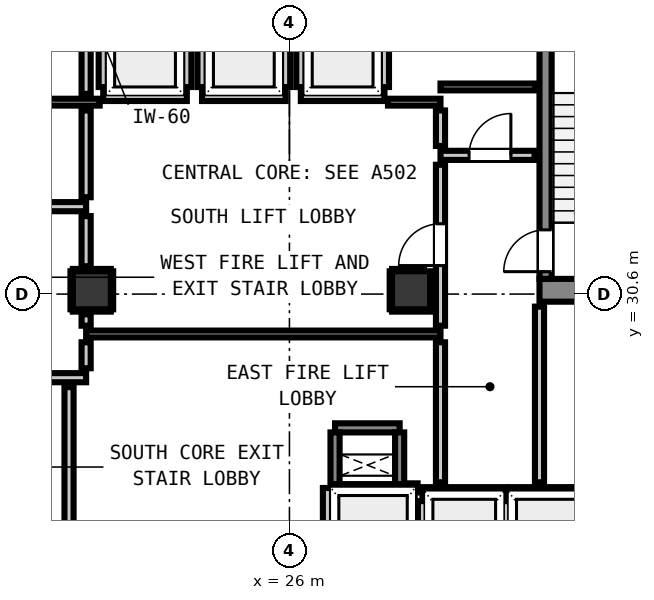
"""IFC4 building model, lengths in metres.
Left out: names, types, materials, properties, quantities, classifications, styles, units other than length and angle.
Written with IfcOpenShell. Run it as: python <this file> out.ifc"""

import sys

from ifc_helpers import new_model, si_unit, direction, frame, frame_2d, origin, origin_2d, place, context, subcontext, project, spatial, rectangle, extrude, element, fill, save


model = new_model("IFC4")
c1 = context("Model", 3, precision=1e-05, world=origin(), true_north=direction((0.0, 1.0)))
c2 = subcontext(c1, "Body", "Model", "MODEL_VIEW")
j1 = project(units=[si_unit("LENGTHUNIT", "METRE"), si_unit("PLANEANGLEUNIT", "RADIAN")], contexts=[c1])
p1 = place(None, origin())
s1 = spatial("IfcSite", under=j1, at=p1, CompositionType="ELEMENT")
p2 = place(p1, origin())
s2 = spatial("IfcBuilding", under=s1, at=p2, CompositionType="ELEMENT")
p3 = place(p2, frame((0.0, 0.0, 13.6)))
s3 = spatial("IfcBuildingStorey", under=s2, at=p3, CompositionType="ELEMENT", Elevation=13.6)
p4 = place(p3, frame((32.58, 30.7, 0.0), z_axis=(0.0, 0.0, 1.0), x_axis=(1.0, 0.0, 0.0)))
e1 = element("IfcWall", 1, at=p4, inside=s3, PredefinedType="SHEAR", context=c2, shape_type="SweptSolid", body=[
    extrude(rectangle(XDim=3.415, YDim=0.6, at=frame_2d((1.708, 0.0))), origin(), (0.0, 0.0, 1.0), 4.2),
])
p5 = place(p3, frame((32.74, 31.0, 0.0), z_axis=(0.0, 0.0, 1.0), x_axis=(0.0, 1.0, 0.0)))
e2 = element("IfcWall", 2, at=p5, inside=s3, PredefinedType="SHEAR", context=c2, shape_type="SweptSolid", body=[
    extrude(rectangle(XDim=7.8, YDim=0.32, at=frame_2d((3.9, 0.0))), origin(), (0.0, 0.0, 1.0), 4.2),
])
p6 = place(p5, frame((0.19, 0.0, 0.0)))
e3 = element("IfcOpeningElement", 3, at=p6, cuts=e2, PredefinedType="OPENING", context=c2, shape_type="SweptSolid", body=[
    extrude(rectangle(XDim=1.1, YDim=2.15, at=frame_2d((0.55, 1.075))), frame((0.0, 0.17, 0.0), z_axis=(0.0, -1.0, 0.0), x_axis=(1.0, 0.0, 0.0)), (0.0, 0.0, 1.0), 0.34),
])
for number, where, z_axis, x_axis in (
    (4, (27.2, 25.48, 0.0), (0.0, 0.0, 1.0), (1.0, 0.0, 0.0)),
    (5, (27.2, 27.08, 0.0), (0.0, 0.0, 1.0), (1.0, 0.0, 0.0)),
):
    element("IfcWall", number, at=place(p3, frame(where, z_axis=z_axis, x_axis=x_axis)), inside=s3, PredefinedType="SHEAR", context=c2, shape_type="SweptSolid", body=[
        extrude(rectangle(XDim=1.7, YDim=0.24, at=frame_2d((0.85, 0.0))), origin(), (0.0, 0.0, 1.0), 4.2),
    ])
for number, where, z_axis, x_axis in (
    (6, (27.2, 25.6, 0.0), (0.0, 0.0, 1.0), (0.0, 1.0, 0.0)),
    (7, (28.9, 25.6, 0.0), (0.0, 0.0, 1.0), (0.0, 1.0, 0.0)),
):
    element("IfcWall", number, at=place(p3, frame(where, z_axis=z_axis, x_axis=x_axis)), inside=s3, PredefinedType="SHEAR", context=c2, shape_type="SweptSolid", body=[
        extrude(rectangle(XDim=1.36, YDim=0.24, at=frame_2d((0.68, 0.0))), origin(), (0.0, 0.0, 1.0), 4.2),
    ])
for number, where, z_axis, x_axis in (
    (8, (20.8, 30.7, 0.0), (0.0, 0.0, 1.0), (1.0, 0.0, 0.0)),
    (9, (29.2, 30.7, 0.0), (0.0, 0.0, 1.0), (1.0, 0.0, 0.0)),
):
    element("IfcColumn", number, at=place(p3, frame(where, z_axis=z_axis, x_axis=x_axis)), inside=s3, PredefinedType="COLUMN", context=c2, shape_type="SweptSolid", body=[
        extrude(rectangle(XDim=1.0, YDim=1.0, at=origin_2d()), origin(), (0.0, 0.0, 1.0), 4.2),
    ])
p7 = place(p3, frame((21.1, 35.8, 0.0), z_axis=(0.0, 0.0, 1.0), x_axis=(1.0, 0.0, 0.0)))
e10 = element("IfcWall", 10, at=p7, inside=s3, PredefinedType="PARTITIONING", context=c2, shape_type="SweptSolid", body=[
    extrude(rectangle(XDim=2.2, YDim=0.24, at=frame_2d((1.1, 0.0))), origin(), (0.0, 0.0, 1.0), 3.78),
])
p8 = place(p3, frame((21.1, 36.048, 0.0), z_axis=(0.0, 0.0, 1.0), x_axis=(0.0, 1.0, 0.0)))
e11 = element("IfcWall", 11, at=p8, inside=s3, PredefinedType="PARTITIONING", context=c2, shape_type="SweptSolid", body=[
    extrude(rectangle(XDim=2.104, YDim=0.24, at=frame_2d((1.052, 0.0))), origin(), (0.0, 0.0, 1.0), 2.815),
])
p9 = place(p3, frame((23.3, 36.048, 0.0), z_axis=(0.0, 0.0, 1.0), x_axis=(0.0, 1.0, 0.0)))
e12 = element("IfcWall", 12, at=p9, inside=s3, PredefinedType="PARTITIONING", context=c2, shape_type="SweptSolid", body=[
    extrude(rectangle(XDim=2.104, YDim=0.24, at=frame_2d((1.052, 0.0))), origin(), (0.0, 0.0, 1.0), 3.78),
])
p10 = place(p3, frame((23.7, 35.8, 0.0), z_axis=(0.0, 0.0, 1.0), x_axis=(1.0, 0.0, 0.0)))
e13 = element("IfcWall", 13, at=p10, inside=s3, PredefinedType="PARTITIONING", context=c2, shape_type="SweptSolid", body=[
    extrude(rectangle(XDim=2.2, YDim=0.24, at=frame_2d((1.1, 0.0))), origin(), (0.0, 0.0, 1.0), 3.78),
])
for number, where, z_axis, x_axis in (
    (14, (23.7, 36.048, 0.0), (0.0, 0.0, 1.0), (0.0, 1.0, 0.0)),
    (15, (25.9, 36.048, 0.0), (0.0, 0.0, 1.0), (0.0, 1.0, 0.0)),
):
    element("IfcWall", number, at=place(p3, frame(where, z_axis=z_axis, x_axis=x_axis)), inside=s3, PredefinedType="PARTITIONING", context=c2, shape_type="SweptSolid", body=[
        extrude(rectangle(XDim=2.104, YDim=0.24, at=frame_2d((1.052, 0.0))), origin(), (0.0, 0.0, 1.0), 3.78),
    ])
p11 = place(p3, frame((26.3, 35.8, 0.0), z_axis=(0.0, 0.0, 1.0), x_axis=(1.0, 0.0, 0.0)))
e16 = element("IfcWall", 16, at=p11, inside=s3, PredefinedType="PARTITIONING", context=c2, shape_type="SweptSolid", body=[
    extrude(rectangle(XDim=2.2, YDim=0.24, at=frame_2d((1.1, 0.0))), origin(), (0.0, 0.0, 1.0), 3.78),
])
for number, where, z_axis, x_axis in (
    (17, (26.3, 36.048, 0.0), (0.0, 0.0, 1.0), (0.0, 1.0, 0.0)),
    (18, (28.5, 36.048, 0.0), (0.0, 0.0, 1.0), (0.0, 1.0, 0.0)),
):
    element("IfcWall", number, at=place(p3, frame(where, z_axis=z_axis, x_axis=x_axis)), inside=s3, PredefinedType="PARTITIONING", context=c2, shape_type="SweptSolid", body=[
        extrude(rectangle(XDim=2.104, YDim=0.24, at=frame_2d((1.052, 0.0))), origin(), (0.0, 0.0, 1.0), 3.78),
    ])
p12 = place(p3, frame((29.5, 25.4, 0.0), z_axis=(0.0, 0.0, 1.0), x_axis=(1.0, 0.0, 0.0)))
e19 = element("IfcWall", 19, at=p12, inside=s3, PredefinedType="PARTITIONING", context=c2, shape_type="SweptSolid", body=[
    extrude(rectangle(XDim=2.2, YDim=0.24, at=frame_2d((1.1, 0.0))), origin(), (0.0, 0.0, 1.0), 3.78),
])
p13 = place(p3, frame((29.5, 22.632, 0.0), z_axis=(0.0, 0.0, 1.0), x_axis=(0.0, 1.0, 0.0)))
e20 = element("IfcWall", 20, at=p13, inside=s3, PredefinedType="PARTITIONING", context=c2, shape_type="SweptSolid", body=[
    extrude(rectangle(XDim=2.52, YDim=0.24, at=frame_2d((1.26, 0.0))), origin(), (0.0, 0.0, 1.0), 2.815),
])
p14 = place(p3, frame((31.7, 22.73, 0.0), z_axis=(0.0, 0.0, 1.0), x_axis=(0.0, 1.0, 0.0)))
e21 = element("IfcWall", 21, at=p14, inside=s3, PredefinedType="PARTITIONING", context=c2, shape_type="SweptSolid", body=[
    extrude(rectangle(XDim=2.422, YDim=0.24, at=frame_2d((1.211, 0.0))), origin(), (0.0, 0.0, 1.0), 3.78),
])
p15 = place(p3, frame((31.828, 25.4, 0.0), z_axis=(0.0, 0.0, 1.0), x_axis=(1.0, 0.0, 0.0)))
e22 = element("IfcWall", 22, at=p15, inside=s3, PredefinedType="PARTITIONING", context=c2, shape_type="SweptSolid", body=[
    extrude(rectangle(XDim=2.072, YDim=0.24, at=frame_2d((1.036, 0.0))), origin(), (0.0, 0.0, 1.0), 3.78),
])
p16 = place(p3, frame((29.103, 25.5, 0.0), z_axis=(0.0, 0.0, 1.0), x_axis=(1.0, 0.0, 0.0)))
e23 = element("IfcWall", 23, at=p16, inside=s3, PredefinedType="PARTITIONING", context=c2, shape_type="SweptSolid", body=[
    extrude(rectangle(XDim=0.269, YDim=0.24, at=frame_2d((0.135, 0.0))), origin(), (0.0, 0.0, 1.0), 3.78),
])
p17 = place(p3, frame((27.0, 22.73, 0.0), z_axis=(0.0, 0.0, 1.0), x_axis=(0.0, 1.0, 0.0)))
e24 = element("IfcWall", 24, at=p17, inside=s3, PredefinedType="PARTITIONING", context=c2, shape_type="SweptSolid", body=[
    extrude(rectangle(XDim=2.768, YDim=0.24, at=frame_2d((1.384, 0.0))), origin(), (0.0, 0.0, 1.0), 3.78),
])
p18 = place(p3, frame((17.45, 28.4, 0.0), z_axis=(0.0, 0.0, 1.0), x_axis=(1.0, 0.0, 0.0)))
e25 = element("IfcWall", 25, at=p18, inside=s3, PredefinedType="PARTITIONING", context=c2, shape_type="SweptSolid", body=[
    extrude(rectangle(XDim=3.2, YDim=0.24, at=frame_2d((1.6, 0.0))), origin(), (0.0, 0.0, 1.0), 3.78),
])
p19 = place(p18, frame((0.784, 0.0, 0.0)))
e26 = element("IfcOpeningElement", 26, at=p19, cuts=e25, PredefinedType="OPENING", context=c2, shape_type="SweptSolid", body=[
    extrude(rectangle(XDim=1.1, YDim=2.15, at=frame_2d((0.55, 1.075))), frame((0.0, 0.13, 0.0), z_axis=(0.0, -1.0, 0.0), x_axis=(1.0, 0.0, 0.0)), (0.0, 0.0, 1.0), 0.26),
])
p20 = place(p3, frame((17.45, 32.9, 0.0), z_axis=(0.0, 0.0, 1.0), x_axis=(1.0, 0.0, 0.0)))
e27 = element("IfcWall", 27, at=p20, inside=s3, PredefinedType="PARTITIONING", context=c2, shape_type="SweptSolid", body=[
    extrude(rectangle(XDim=3.2, YDim=0.24, at=frame_2d((1.6, 0.0))), origin(), (0.0, 0.0, 1.0), 3.78),
])
p21 = place(p20, frame((0.159, 0.0, 0.0)))
e28 = element("IfcOpeningElement", 28, at=p21, cuts=e27, PredefinedType="OPENING", context=c2, shape_type="SweptSolid", body=[
    extrude(rectangle(XDim=1.1, YDim=2.15, at=frame_2d((0.55, 1.075))), frame((0.0, 0.13, 0.0), z_axis=(0.0, -1.0, 0.0), x_axis=(1.0, 0.0, 0.0)), (0.0, 0.0, 1.0), 0.26),
])
p22 = place(p3, frame((29.975, 34.25, 0.0), z_axis=(0.0, 0.0, 1.0), x_axis=(1.0, 0.0, 0.0)))
e29 = element("IfcWall", 29, at=p22, inside=s3, PredefinedType="PARTITIONING", context=c2, shape_type="SweptSolid", body=[
    extrude(rectangle(XDim=2.475, YDim=0.24, at=frame_2d((1.237, 0.0))), origin(), (0.0, 0.0, 1.0), 3.78),
])
p23 = place(p22, frame((0.752, 0.0, 0.0)))
e30 = element("IfcOpeningElement", 30, at=p23, cuts=e29, PredefinedType="OPENING", context=c2, shape_type="SweptSolid", body=[
    extrude(rectangle(XDim=1.1, YDim=2.15, at=frame_2d((0.55, 1.075))), frame((0.0, 0.13, 0.0), z_axis=(0.0, -1.0, 0.0), x_axis=(1.0, 0.0, 0.0)), (0.0, 0.0, 1.0), 0.26),
])
p24 = place(p3, frame((20.65, 29.55, 0.0), z_axis=(0.0, 0.0, 1.0), x_axis=(1.0, 0.0, 0.0)))
e31 = element("IfcWall", 31, at=p24, inside=s3, PredefinedType="PARTITIONING", context=c2, shape_type="SweptSolid", body=[
    extrude(rectangle(XDim=9.325, YDim=0.18, at=frame_2d((4.663, 0.0))), origin(), (0.0, 0.0, 1.0), 3.78),
])
p25 = place(p3, frame((18.95, 35.65, 0.0), z_axis=(0.0, 0.0, 1.0), x_axis=(1.0, 0.0, 0.0)))
e32 = element("IfcWall", 32, at=p25, inside=s3, PredefinedType="PARTITIONING", context=c2, shape_type="SweptSolid", body=[
    extrude(rectangle(XDim=2.057, YDim=0.18, at=frame_2d((1.029, 0.0))), origin(), (0.0, 0.0, 1.0), 3.78),
])
p26 = place(p3, frame((28.593, 35.65, 0.0), z_axis=(0.0, 0.0, 1.0), x_axis=(1.0, 0.0, 0.0)))
e33 = element("IfcWall", 33, at=p26, inside=s3, PredefinedType="PARTITIONING", context=c2, shape_type="SweptSolid", body=[
    extrude(rectangle(XDim=1.382, YDim=0.18, at=frame_2d((0.691, 0.0))), origin(), (0.0, 0.0, 1.0), 3.78),
])
p27 = place(p3, frame((29.975, 36.05, 0.0), z_axis=(0.0, 0.0, 1.0), x_axis=(1.0, 0.0, 0.0)))
e34 = element("IfcWall", 34, at=p27, inside=s3, PredefinedType="PARTITIONING", context=c2, shape_type="SweptSolid", body=[
    extrude(rectangle(XDim=2.505, YDim=0.18, at=frame_2d((1.252, 0.0))), origin(), (0.0, 0.0, 1.0), 3.78),
])
p28 = place(p3, frame((20.2, 22.586, 0.0), z_axis=(0.0, 0.0, 1.0), x_axis=(0.0, 1.0, 0.0)))
e35 = element("IfcWall", 35, at=p28, inside=s3, PredefinedType="PARTITIONING", context=c2, shape_type="SweptSolid", body=[
    extrude(rectangle(XDim=5.566, YDim=0.24, at=frame_2d((2.783, 0.0))), origin(), (0.0, 0.0, 1.0), 3.78),
])
p29 = place(p3, frame((20.65, 28.648, 0.0), z_axis=(0.0, 0.0, 1.0), x_axis=(0.0, 1.0, 0.0)))
e36 = element("IfcWall", 36, at=p29, inside=s3, PredefinedType="PARTITIONING", context=c2, shape_type="SweptSolid", body=[
    extrude(rectangle(XDim=0.684, YDim=0.24, at=frame_2d((0.342, 0.0))), origin(), (0.0, 0.0, 1.0), 2.815),
])
p30 = place(p3, frame((20.65, 29.768, 0.0), z_axis=(0.0, 0.0, 1.0), x_axis=(0.0, 1.0, 0.0)))
e37 = element("IfcWall", 37, at=p30, inside=s3, PredefinedType="PARTITIONING", context=c2, shape_type="SweptSolid", body=[
    extrude(rectangle(XDim=0.3, YDim=0.24, at=frame_2d((0.15, 0.0))), origin(), (0.0, 0.0, 1.0), 2.815),
])
p31 = place(p3, frame((20.65, 31.332, 0.0), z_axis=(0.0, 0.0, 1.0), x_axis=(0.0, 1.0, 0.0)))
e38 = element("IfcWall", 38, at=p31, inside=s3, PredefinedType="PARTITIONING", context=c2, shape_type="SweptSolid", body=[
    extrude(rectangle(XDim=1.32, YDim=0.24, at=frame_2d((0.66, 0.0))), origin(), (0.0, 0.0, 1.0), 2.815),
])
p32 = place(p3, frame((20.65, 33.148, 0.0), z_axis=(0.0, 0.0, 1.0), x_axis=(0.0, 1.0, 0.0)))
e39 = element("IfcWall", 39, at=p32, inside=s3, PredefinedType="PARTITIONING", context=c2, shape_type="SweptSolid", body=[
    extrude(rectangle(XDim=2.284, YDim=0.24, at=frame_2d((1.142, 0.0))), origin(), (0.0, 0.0, 1.0), 2.815),
])
p33 = place(p3, frame((20.65, 35.868, 0.0), z_axis=(0.0, 0.0, 1.0), x_axis=(0.0, 1.0, 0.0)))
e40 = element("IfcWall", 40, at=p33, inside=s3, PredefinedType="PARTITIONING", context=c2, shape_type="SweptSolid", body=[
    extrude(rectangle(XDim=2.684, YDim=0.24, at=frame_2d((1.342, 0.0))), origin(), (0.0, 0.0, 1.0), 2.815),
])
p34 = place(p3, frame((29.975, 25.648, 0.0), z_axis=(0.0, 0.0, 1.0), x_axis=(0.0, 1.0, 0.0)))
e41 = element("IfcWall", 41, at=p34, inside=s3, PredefinedType="PARTITIONING", context=c2, shape_type="SweptSolid", body=[
    extrude(rectangle(XDim=3.684, YDim=0.24, at=frame_2d((1.842, 0.0))), origin(), (0.0, 0.0, 1.0), 3.78),
])
p35 = place(p3, frame((29.975, 29.768, 0.0), z_axis=(0.0, 0.0, 1.0), x_axis=(0.0, 1.0, 0.0)))
e42 = element("IfcWall", 42, at=p35, inside=s3, PredefinedType="PARTITIONING", context=c2, shape_type="SweptSolid", body=[
    extrude(rectangle(XDim=4.234, YDim=0.24, at=frame_2d((2.117, 0.0))), origin(), (0.0, 0.0, 1.0), 3.78),
])
p36 = place(p35, frame((1.582, 0.0, 0.0)))
e43 = element("IfcOpeningElement", 43, at=p36, cuts=e42, PredefinedType="OPENING", context=c2, shape_type="SweptSolid", body=[
    extrude(rectangle(XDim=1.1, YDim=2.15, at=frame_2d((0.55, 1.075))), frame((0.0, 0.13, 0.0), z_axis=(0.0, -1.0, 0.0), x_axis=(1.0, 0.0, 0.0)), (0.0, 0.0, 1.0), 0.26),
])
p37 = place(p3, frame((29.975, 34.498, 0.0), z_axis=(0.0, 0.0, 1.0), x_axis=(0.0, 1.0, 0.0)))
e44 = element("IfcWall", 44, at=p37, inside=s3, PredefinedType="PARTITIONING", context=c2, shape_type="SweptSolid", body=[
    extrude(rectangle(XDim=0.934, YDim=0.24, at=frame_2d((0.467, 0.0))), origin(), (0.0, 0.0, 1.0), 3.78),
])
p38 = place(p3, frame((32.58, 25.648, 0.0), z_axis=(0.0, 0.0, 1.0), x_axis=(0.0, 1.0, 0.0)))
e45 = element("IfcWall", 45, at=p38, inside=s3, PredefinedType="PARTITIONING", context=c2, shape_type="SweptSolid", body=[
    extrude(rectangle(XDim=4.622, YDim=0.24, at=frame_2d((2.311, 0.0))), origin(), (0.0, 0.0, 1.0), 3.78),
])
for number, where, z_axis, x_axis in (
    (46, (20.3, 30.168, 0.0), (0.0, 0.0, 1.0), (1.0, 0.0, 0.0)),
    (47, (20.3, 31.232, 0.0), (0.0, 0.0, 1.0), (1.0, 0.0, 0.0)),
    (48, (20.268, 30.2, 0.0), (0.0, 0.0, 1.0), (0.0, 1.0, 0.0)),
    (49, (21.332, 30.2, 0.0), (0.0, 0.0, 1.0), (0.0, 1.0, 0.0)),
    (50, (28.7, 30.168, 0.0), (0.0, 0.0, 1.0), (1.0, 0.0, 0.0)),
):
    element("IfcWall", number, at=place(p3, frame(where, z_axis=z_axis, x_axis=x_axis)), inside=s3, PredefinedType="PARTITIONING", context=c2, shape_type="SweptSolid", body=[
        extrude(rectangle(XDim=1.0, YDim=0.06, at=frame_2d((0.5, 0.0))), origin(), (0.0, 0.0, 1.0), 1.45),
    ])
p39 = place(p3, frame((28.7, 31.232, 0.0), z_axis=(0.0, 0.0, 1.0), x_axis=(1.0, 0.0, 0.0)))
e51 = element("IfcWall", 51, at=p39, inside=s3, PredefinedType="PARTITIONING", context=c2, shape_type="SweptSolid", body=[
    extrude(rectangle(XDim=0.841, YDim=0.06, at=frame_2d((0.42, 0.0))), origin(), (0.0, 0.0, 1.0), 1.45),
])
p40 = place(p3, frame((28.668, 30.2, 0.0), z_axis=(0.0, 0.0, 1.0), x_axis=(0.0, 1.0, 0.0)))
e52 = element("IfcWall", 52, at=p40, inside=s3, PredefinedType="PARTITIONING", context=c2, shape_type="SweptSolid", body=[
    extrude(rectangle(XDim=1.0, YDim=0.06, at=frame_2d((0.5, 0.0))), origin(), (0.0, 0.0, 1.0), 1.45),
])
p41 = place(p3, frame((29.732, 30.2, 0.0), z_axis=(0.0, 0.0, 1.0), x_axis=(0.0, 1.0, 0.0)))
e53 = element("IfcWall", 53, at=p41, inside=s3, PredefinedType="PARTITIONING", context=c2, shape_type="SweptSolid", body=[
    extrude(rectangle(XDim=0.772, YDim=0.06, at=frame_2d((0.386, 0.0))), origin(), (0.0, 0.0, 1.0), 1.45),
])
p42 = place(p6, origin())
e54 = element("IfcDoor", 54, at=p42, inside=s3, OperationType="SINGLE_SWING_LEFT", PredefinedType="DOOR", context=c2, shape_type="SweptSolid", body=[
    extrude(rectangle(XDim=1.1, YDim=2.15, at=frame_2d((0.55, 1.075))), frame((0.0, 0.025, 0.0), z_axis=(0.0, -1.0, 0.0), x_axis=(1.0, 0.0, 0.0)), (0.0, 0.0, 1.0), 0.05),
])
fill(e3, e54)
p43 = place(p36, origin())
e55 = element("IfcDoor", 55, at=p43, inside=s3, OperationType="SINGLE_SWING_LEFT", PredefinedType="DOOR", context=c2, shape_type="SweptSolid", body=[
    extrude(rectangle(XDim=1.1, YDim=2.15, at=frame_2d((0.55, 1.075))), frame((0.0, 0.025, 0.0), z_axis=(0.0, -1.0, 0.0), x_axis=(1.0, 0.0, 0.0)), (0.0, 0.0, 1.0), 0.05),
])
fill(e43, e55)
p44 = place(p23, origin())
e56 = element("IfcDoor", 56, at=p44, inside=s3, OperationType="SINGLE_SWING_RIGHT", PredefinedType="DOOR", context=c2, shape_type="SweptSolid", body=[
    extrude(rectangle(XDim=1.1, YDim=2.15, at=frame_2d((0.55, 1.075))), frame((0.0, 0.025, 0.0), z_axis=(0.0, -1.0, 0.0), x_axis=(1.0, 0.0, 0.0)), (0.0, 0.0, 1.0), 0.05),
])
fill(e30, e56)
save(model, sys.argv[1])
